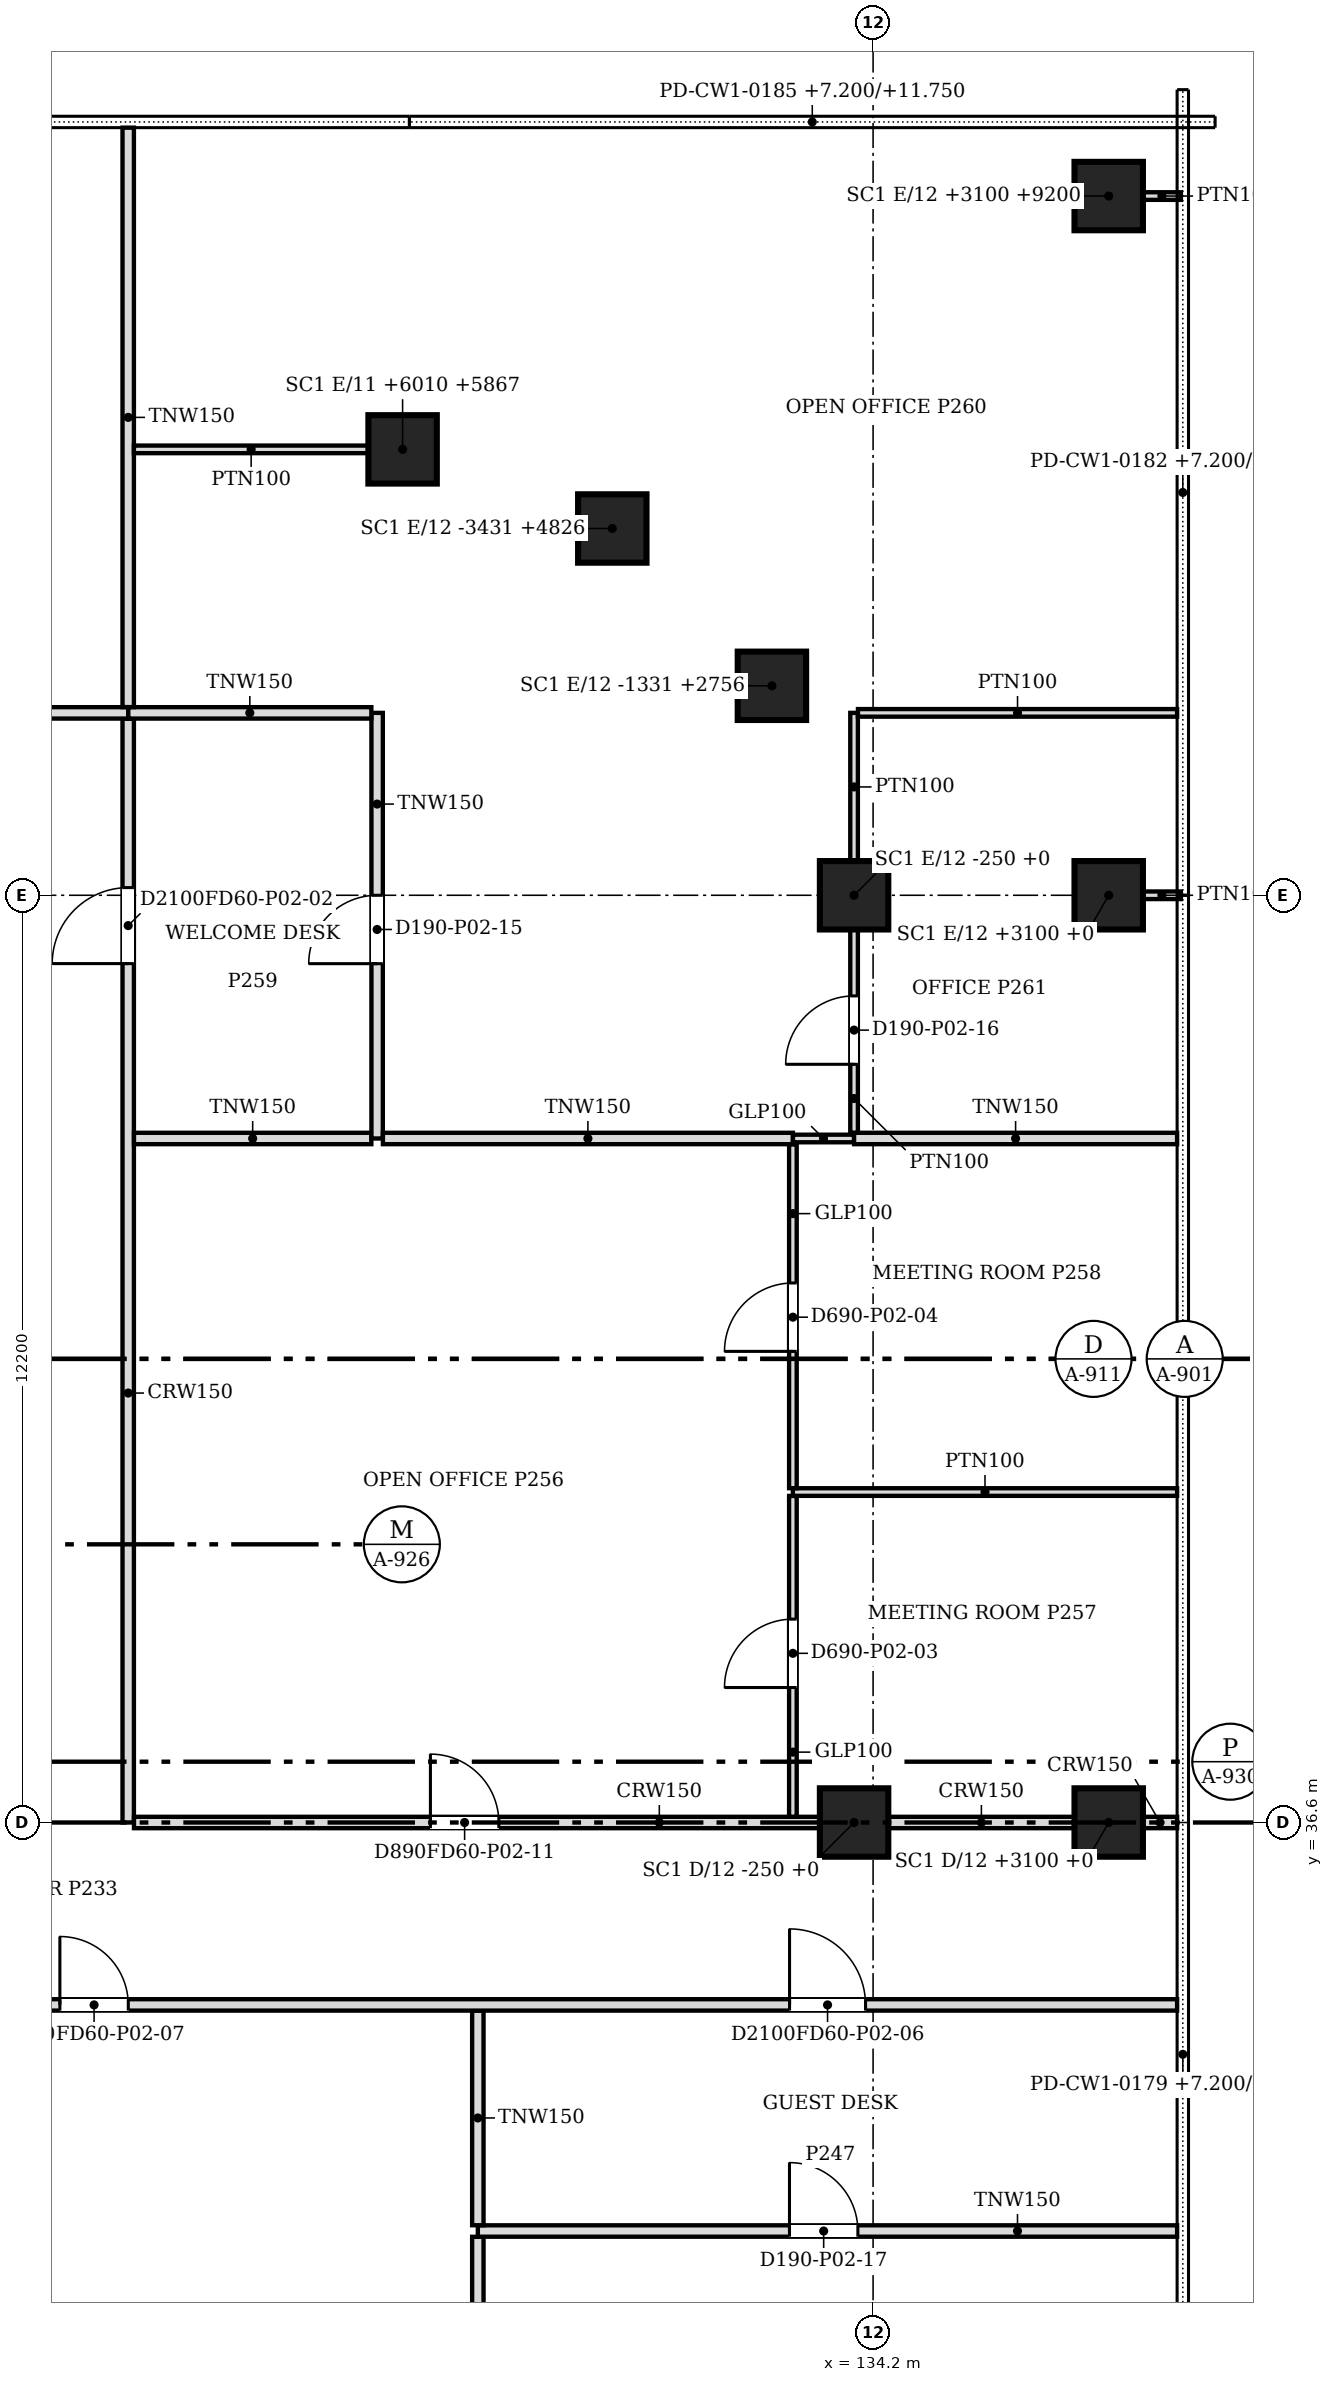
"""IFC4 building model, lengths in metres.
Left out: names, types, materials, properties, quantities, classifications, styles, units other than length and angle.
Written with IfcOpenShell. Run it as: python <this file> out.ifc"""

import sys

from ifc_helpers import new_model, si_unit, direction, frame, frame_2d, origin, origin_2d, place, context, subcontext, project, spatial, rectangle, extrude, source, transform, mapped, element, fill, save


model = new_model("IFC4")
c1 = context("Model", 3, precision=1e-05, world=origin(), true_north=direction((0.0, 1.0)))
c2 = subcontext(c1, "Body", "Model", "MODEL_VIEW")
j1 = project(units=[si_unit("LENGTHUNIT", "METRE"), si_unit("PLANEANGLEUNIT", "RADIAN")], contexts=[c1])
p1 = place(None, origin())
s1 = spatial("IfcSite", under=j1, at=p1, CompositionType="ELEMENT")
p2 = place(p1, origin())
s2 = spatial("IfcBuilding", under=s1, at=p2, CompositionType="ELEMENT")
p3 = place(p2, frame((0.0, 0.0, 7.2)))
s3 = spatial("IfcBuildingStorey", under=s2, at=p3, CompositionType="ELEMENT", Elevation=7.2)
for number, where, z_axis, x_axis in (
    (1, (133.95, 36.6, 0.0), (0.0, 0.0, 1.0), (1.0, 0.0, 0.0)),
    (2, (133.95, 48.8, 0.0), (0.0, 0.0, 1.0), (1.0, 0.0, 0.0)),
    (3, (132.869, 51.556, 0.0), (0.0, 0.0, 1.0), (1.0, 0.0, 0.0)),
    (4, (130.769, 53.626, 0.0), (0.0, 0.0, 1.0), (1.0, 0.0, 0.0)),
    (5, (128.01, 54.667, 0.0), (0.0, 0.0, 1.0), (1.0, 0.0, 0.0)),
    (6, (137.3, 58.0, 0.0), (0.0, 0.0, 1.0), (1.0, 0.0, 0.0)),
    (7, (137.3, 48.8, 0.0), (0.0, 0.0, 1.0), (1.0, 0.0, 0.0)),
    (8, (137.3, 36.6, 0.0), (0.0, 0.0, 1.0), (1.0, 0.0, 0.0)),
):
    element("IfcColumn", number, at=place(p3, frame(where, z_axis=z_axis, x_axis=x_axis)), inside=s3, PredefinedType="COLUMN", context=c2, shape_type="SweptSolid", body=[
        extrude(rectangle(XDim=0.9, YDim=0.9, at=origin_2d()), origin(), (0.0, 0.0, 1.0), 4.55),
    ])
p4 = place(p3, frame((129.0, 18.8, 0.0), z_axis=(0.0, 0.0, 1.0), x_axis=(0.0, 1.0, 0.0)))
e9 = element("IfcWall", 9, at=p4, inside=s3, PredefinedType="PARTITIONING", context=c2, shape_type="SweptSolid", body=[
    extrude(rectangle(XDim=12.349, YDim=0.15, at=frame_2d((6.174, 0.0))), origin(), (0.0, 0.0, 1.0), 3.715),
])
p5 = place(p3, frame((138.2, 31.225, 0.0), z_axis=(0.0, 0.0, 1.0), x_axis=(-1.0, 0.0, 0.0)))
e10 = element("IfcWall", 10, at=p5, inside=s3, PredefinedType="PARTITIONING", context=c2, shape_type="SweptSolid", body=[
    extrude(rectangle(XDim=9.2, YDim=0.15, at=frame_2d((4.6, 0.0))), origin(), (0.0, 0.0, 1.0), 3.715),
])
m1 = source(origin(), c2, "Body", "SweptSolid", [
    extrude(rectangle(XDim=0.9, YDim=2.1, at=frame_2d((0.45, 1.05))), frame((0.0, 0.085, 0.0), z_axis=(0.0, -1.0, 0.0), x_axis=(1.0, 0.0, 0.0)), (0.0, 0.0, 1.0), 0.17),
])
p6 = place(p5, frame((4.2, 0.0, 0.0)))
e11 = element("IfcOpeningElement", 11, at=p6, cuts=e10, PredefinedType="OPENING", context=c2, shape_type="MappedRepresentation", body=[
    mapped(m1, transform((0.0, 0.0, 0.0), scale=1.0)),
])
p7 = place(p3, frame((129.0, 31.301, 0.0), z_axis=(0.0, 0.0, 1.0), x_axis=(0.0, 1.0, 0.0)))
e12 = element("IfcWall", 12, at=p7, inside=s3, PredefinedType="PARTITIONING", context=c2, shape_type="SweptSolid", body=[
    extrude(rectangle(XDim=2.823, YDim=0.15, at=frame_2d((1.412, 0.0))), origin(), (0.0, 0.0, 1.0), 3.715),
])
p8 = place(p3, frame((138.2, 34.2, 0.0), z_axis=(0.0, 0.0, 1.0), x_axis=(-1.0, 0.0, 0.0)))
e13 = element("IfcWall", 13, at=p8, inside=s3, PredefinedType="PARTITIONING", context=c2, shape_type="SweptSolid", body=[
    extrude(rectangle(XDim=46.7, YDim=0.15, at=frame_2d((23.35, 0.0))), origin(), (0.0, 0.0, 1.0), 3.715),
])
m2 = source(origin(), c2, "Body", "SweptSolid", [
    extrude(rectangle(XDim=1.0, YDim=2.1, at=frame_2d((0.5, 1.05))), frame((0.0, 0.085, 0.0), z_axis=(0.0, -1.0, 0.0), x_axis=(1.0, 0.0, 0.0)), (0.0, 0.0, 1.0), 0.17),
])
p9 = place(p8, frame((32.499, 0.0, 0.0)))
e14 = element("IfcOpeningElement", 14, at=p9, cuts=e13, PredefinedType="OPENING", context=c2, shape_type="MappedRepresentation", body=[
    mapped(m2, transform((0.0, 0.0, 0.0), scale=1.0)),
])
p10 = place(p8, frame((4.099, 0.0, 0.0)))
e15 = element("IfcOpeningElement", 15, at=p10, cuts=e13, PredefinedType="OPENING", context=c2, shape_type="MappedRepresentation", body=[
    mapped(m2, transform((0.0, 0.0, 0.0), scale=1.0)),
])
p11 = place(p8, frame((13.799, 0.0, 0.0)))
e16 = element("IfcOpeningElement", 16, at=p11, cuts=e13, PredefinedType="OPENING", context=c2, shape_type="MappedRepresentation", body=[
    mapped(m1, transform((0.0, 0.0, 0.0), scale=1.0)),
])
p12 = place(p8, frame((41.3, 0.0, 0.0)))
e17 = element("IfcOpeningElement", 17, at=p12, cuts=e13, PredefinedType="OPENING", context=c2, shape_type="MappedRepresentation", body=[
    mapped(m1, transform((0.0, 0.0, 0.0), scale=1.0)),
])
p13 = place(p8, frame((23.7, 0.0, 0.0)))
e18 = element("IfcOpeningElement", 18, at=p13, cuts=e13, PredefinedType="OPENING", context=c2, shape_type="MappedRepresentation", body=[
    mapped(m2, transform((0.0, 0.0, 0.0), scale=1.0)),
])
p14 = place(p3, frame((124.4, 51.124, 0.0), z_axis=(0.0, 0.0, 1.0), x_axis=(0.0, -1.0, 0.0)))
e19 = element("IfcWall", 19, at=p14, inside=s3, PredefinedType="PARTITIONING", context=c2, shape_type="SweptSolid", body=[
    extrude(rectangle(XDim=14.524, YDim=0.15, at=frame_2d((7.262, 0.0))), origin(), (0.0, 0.0, 1.0), 3.715),
])
p15 = place(p14, frame((2.223, 0.0, 0.0)))
e20 = element("IfcOpeningElement", 20, at=p15, cuts=e19, PredefinedType="OPENING", context=c2, shape_type="MappedRepresentation", body=[
    mapped(m2, transform((0.0, 0.0, 0.0), scale=1.0)),
])
p16 = place(p3, frame((124.476, 36.6, 0.0), z_axis=(0.0, 0.0, 1.0), x_axis=(1.0, 0.0, 0.0)))
e21 = element("IfcWall", 21, at=p16, inside=s3, PredefinedType="PARTITIONING", context=c2, shape_type="SweptSolid", body=[
    extrude(rectangle(XDim=9.023, YDim=0.15, at=frame_2d((4.511, 0.0))), origin(), (0.0, 0.0, 1.0), 3.715),
])
p17 = place(p16, frame((3.9, 0.0, 0.0)))
e22 = element("IfcOpeningElement", 22, at=p17, cuts=e21, PredefinedType="OPENING", context=c2, shape_type="MappedRepresentation", body=[
    mapped(m1, transform((0.0, 0.0, 0.0), scale=1.0)),
])
p18 = place(p3, frame((134.401, 36.6, 0.0), z_axis=(0.0, 0.0, 1.0), x_axis=(1.0, 0.0, 0.0)))
e23 = element("IfcWall", 23, at=p18, inside=s3, PredefinedType="PARTITIONING", context=c2, shape_type="SweptSolid", body=[
    extrude(rectangle(XDim=2.448, YDim=0.15, at=frame_2d((1.224, 0.0))), origin(), (0.0, 0.0, 1.0), 3.715),
])
p19 = place(p3, frame((137.751, 36.6, 0.0), z_axis=(0.0, 0.0, 1.0), x_axis=(1.0, 0.0, 0.0)))
e24 = element("IfcWall", 24, at=p19, inside=s3, PredefinedType="PARTITIONING", context=c2, shape_type="SweptSolid", body=[
    extrude(rectangle(XDim=0.449, YDim=0.15, at=frame_2d((0.225, 0.0))), origin(), (0.0, 0.0, 1.0), 3.715),
])
p20 = place(p3, frame((133.145, 40.897, 0.0), z_axis=(0.0, 0.0, 1.0), x_axis=(0.0, -1.0, 0.0)))
e25 = element("IfcWall", 25, at=p20, inside=s3, PredefinedType="PARTITIONING", context=c2, shape_type="SweptSolid", body=[
    extrude(rectangle(XDim=4.221, YDim=0.1, at=frame_2d((2.11, 0.0))), origin(), (0.0, 0.0, 1.0), 3.715),
])
m3 = source(origin(), c2, "Body", "SweptSolid", [
    extrude(rectangle(XDim=0.9, YDim=2.1, at=frame_2d((0.45, 1.05))), frame((0.0, 0.06, 0.0), z_axis=(0.0, -1.0, 0.0), x_axis=(1.0, 0.0, 0.0)), (0.0, 0.0, 1.0), 0.12),
])
p21 = place(p20, frame((1.621, 0.0, 0.0)))
e26 = element("IfcOpeningElement", 26, at=p21, cuts=e25, PredefinedType="OPENING", context=c2, shape_type="MappedRepresentation", body=[
    mapped(m3, transform((0.0, 0.0, 0.0), scale=1.0)),
])
p22 = place(p3, frame((133.145, 40.948, 0.0), z_axis=(0.0, 0.0, 1.0), x_axis=(1.0, 0.0, 0.0)))
e27 = element("IfcWall", 27, at=p22, inside=s3, PredefinedType="PARTITIONING", context=c2, shape_type="SweptSolid", body=[
    extrude(rectangle(XDim=5.055, YDim=0.1, at=frame_2d((2.527, 0.0))), origin(), (0.0, 0.0, 1.0), 3.715),
])
p23 = place(p3, frame((133.145, 45.524, 0.0), z_axis=(0.0, 0.0, 1.0), x_axis=(0.0, -1.0, 0.0)))
e28 = element("IfcWall", 28, at=p23, inside=s3, PredefinedType="PARTITIONING", context=c2, shape_type="SweptSolid", body=[
    extrude(rectangle(XDim=4.525, YDim=0.1, at=frame_2d((2.263, 0.0))), origin(), (0.0, 0.0, 1.0), 3.715),
])
p24 = place(p23, frame((1.825, 0.0, 0.0)))
e29 = element("IfcOpeningElement", 29, at=p24, cuts=e28, PredefinedType="OPENING", context=c2, shape_type="MappedRepresentation", body=[
    mapped(m3, transform((0.0, 0.0, 0.0), scale=1.0)),
])
p25 = place(p3, frame((124.476, 45.6, 0.0), z_axis=(0.0, 0.0, 1.0), x_axis=(1.0, 0.0, 0.0)))
e30 = element("IfcWall", 30, at=p25, inside=s3, PredefinedType="PARTITIONING", context=c2, shape_type="SweptSolid", body=[
    extrude(rectangle(XDim=3.123, YDim=0.15, at=frame_2d((1.562, 0.0))), origin(), (0.0, 0.0, 1.0), 3.715),
])
p26 = place(p3, frame((127.675, 51.2, 0.0), z_axis=(0.0, 0.0, 1.0), x_axis=(0.0, -1.0, 0.0)))
e31 = element("IfcWall", 31, at=p26, inside=s3, PredefinedType="PARTITIONING", context=c2, shape_type="SweptSolid", body=[
    extrude(rectangle(XDim=5.6, YDim=0.15, at=frame_2d((2.8, 0.0))), origin(), (0.0, 0.0, 1.0), 3.715),
])
p27 = place(p26, frame((2.4, 0.0, 0.0)))
e32 = element("IfcOpeningElement", 32, at=p27, cuts=e31, PredefinedType="OPENING", context=c2, shape_type="MappedRepresentation", body=[
    mapped(m1, transform((0.0, 0.0, 0.0), scale=1.0)),
])
p28 = place(p3, frame((127.751, 45.6, 0.0), z_axis=(0.0, 0.0, 1.0), x_axis=(1.0, 0.0, 0.0)))
e33 = element("IfcWall", 33, at=p28, inside=s3, PredefinedType="PARTITIONING", context=c2, shape_type="SweptSolid", body=[
    extrude(rectangle(XDim=5.394, YDim=0.15, at=frame_2d((2.697, 0.0))), origin(), (0.0, 0.0, 1.0), 3.715),
])
p29 = place(p3, frame((133.146, 45.6, 0.0), z_axis=(0.0, 0.0, 1.0), x_axis=(1.0, 0.0, 0.0)))
e34 = element("IfcWall", 34, at=p29, inside=s3, PredefinedType="PARTITIONING", context=c2, shape_type="SweptSolid", body=[
    extrude(rectangle(XDim=0.803, YDim=0.1, at=frame_2d((0.401, 0.0))), origin(), (0.0, 0.0, 1.0), 3.715),
])
p30 = place(p3, frame((133.95, 45.6, 0.0), z_axis=(0.0, 0.0, 1.0), x_axis=(1.0, 0.0, 0.0)))
e35 = element("IfcWall", 35, at=p30, inside=s3, PredefinedType="PARTITIONING", context=c2, shape_type="SweptSolid", body=[
    extrude(rectangle(XDim=4.25, YDim=0.15, at=frame_2d((2.125, 0.0))), origin(), (0.0, 0.0, 1.0), 3.715),
])
p31 = place(p3, frame((133.95, 48.349, 0.0), z_axis=(0.0, 0.0, 1.0), x_axis=(0.0, -1.0, 0.0)))
e36 = element("IfcWall", 36, at=p31, inside=s3, PredefinedType="PARTITIONING", context=c2, shape_type="SweptSolid", body=[
    extrude(rectangle(XDim=2.673, YDim=0.1, at=frame_2d((1.336, 0.0))), origin(), (0.0, 0.0, 1.0), 3.715),
])
p32 = place(p31, frame((0.873, 0.0, 0.0)))
e37 = element("IfcOpeningElement", 37, at=p32, cuts=e36, PredefinedType="OPENING", context=c2, shape_type="MappedRepresentation", body=[
    mapped(m3, transform((0.0, 0.0, 0.0), scale=1.0)),
])
p33 = place(p3, frame((137.75, 48.8, 0.0), z_axis=(0.0, 0.0, 1.0), x_axis=(1.0, 0.0, 0.0)))
e38 = element("IfcWall", 38, at=p33, inside=s3, PredefinedType="PARTITIONING", context=c2, shape_type="SweptSolid", body=[
    extrude(rectangle(XDim=0.5, YDim=0.1, at=frame_2d((0.25, 0.0))), origin(), (0.0, 0.0, 1.0), 3.715),
])
p34 = place(p3, frame((133.95, 49.251, 0.0), z_axis=(0.0, 0.0, 1.0), x_axis=(0.0, 1.0, 0.0)))
e39 = element("IfcWall", 39, at=p34, inside=s3, PredefinedType="PARTITIONING", context=c2, shape_type="SweptSolid", body=[
    extrude(rectangle(XDim=1.949, YDim=0.1, at=frame_2d((0.975, 0.0))), origin(), (0.0, 0.0, 1.0), 3.715),
])
p35 = place(p3, frame((108.5, 51.2, 0.0), z_axis=(0.0, 0.0, 1.0), x_axis=(1.0, 0.0, 0.0)))
e40 = element("IfcWall", 40, at=p35, inside=s3, PredefinedType="PARTITIONING", context=c2, shape_type="SweptSolid", body=[
    extrude(rectangle(XDim=15.9, YDim=0.15, at=frame_2d((7.95, 0.0))), origin(), (0.0, 0.0, 1.0), 3.715),
])
p36 = place(p35, frame((11.551, 0.0, 0.0)))
e41 = element("IfcOpeningElement", 41, at=p36, cuts=e40, PredefinedType="OPENING", context=c2, shape_type="MappedRepresentation", body=[
    mapped(m1, transform((0.0, 0.0, 0.0), scale=1.0)),
])
p37 = place(p35, frame((3.6, 0.0, 0.0)))
e42 = element("IfcOpeningElement", 42, at=p37, cuts=e40, PredefinedType="OPENING", context=c2, shape_type="MappedRepresentation", body=[
    mapped(m1, transform((0.0, 0.0, 0.0), scale=1.0)),
])
p38 = place(p3, frame((124.401, 51.2, 0.0), z_axis=(0.0, 0.0, 1.0), x_axis=(1.0, 0.0, 0.0)))
e43 = element("IfcWall", 43, at=p38, inside=s3, PredefinedType="PARTITIONING", context=c2, shape_type="SweptSolid", body=[
    extrude(rectangle(XDim=3.198, YDim=0.15, at=frame_2d((1.599, 0.0))), origin(), (0.0, 0.0, 1.0), 3.715),
])
p39 = place(p3, frame((134.001, 51.2, 0.0), z_axis=(0.0, 0.0, 1.0), x_axis=(1.0, 0.0, 0.0)))
e44 = element("IfcWall", 44, at=p39, inside=s3, PredefinedType="PARTITIONING", context=c2, shape_type="SweptSolid", body=[
    extrude(rectangle(XDim=4.199, YDim=0.1, at=frame_2d((2.1, 0.0))), origin(), (0.0, 0.0, 1.0), 3.715),
])
p40 = place(p3, frame((124.4, 51.276, 0.0), z_axis=(0.0, 0.0, 1.0), x_axis=(0.0, 1.0, 0.0)))
e45 = element("IfcWall", 45, at=p40, inside=s3, PredefinedType="PARTITIONING", context=c2, shape_type="SweptSolid", body=[
    extrude(rectangle(XDim=7.624, YDim=0.15, at=frame_2d((3.812, 0.0))), origin(), (0.0, 0.0, 1.0), 3.715),
])
p41 = place(p3, frame((127.56, 54.667, 0.0), z_axis=(0.0, 0.0, 1.0), x_axis=(-1.0, 0.0, 0.0)))
e46 = element("IfcWall", 46, at=p41, inside=s3, PredefinedType="PARTITIONING", context=c2, shape_type="SweptSolid", body=[
    extrude(rectangle(XDim=3.085, YDim=0.1, at=frame_2d((1.542, 0.0))), origin(), (0.0, 0.0, 1.0), 3.715),
])
p42 = place(p3, frame((137.75, 58.0, 0.0), z_axis=(0.0, 0.0, 1.0), x_axis=(1.0, 0.0, 0.0)))
e47 = element("IfcWall", 47, at=p42, inside=s3, PredefinedType="PARTITIONING", context=c2, shape_type="SweptSolid", body=[
    extrude(rectangle(XDim=0.5, YDim=0.1, at=frame_2d((0.25, 0.0))), origin(), (0.0, 0.0, 1.0), 3.715),
])
m4 = source(origin(), c2, "Body", "SweptSolid", [
    extrude(rectangle(XDim=0.9, YDim=2.1, at=frame_2d((0.45, 1.05))), frame((0.0, 0.025, 0.0), z_axis=(0.0, -1.0, 0.0), x_axis=(1.0, 0.0, 0.0)), (0.0, 0.0, 1.0), 0.05),
])
p43 = place(p21, origin())
e48 = element("IfcDoor", 48, at=p43, inside=s3, OperationType="SINGLE_SWING_RIGHT", PredefinedType="DOOR", context=c2, shape_type="MappedRepresentation", body=[
    mapped(m4, transform((0.0, 0.0, 0.0), scale=1.0)),
])
fill(e26, e48)
p44 = place(p24, origin())
e49 = element("IfcDoor", 49, at=p44, inside=s3, OperationType="SINGLE_SWING_RIGHT", PredefinedType="DOOR", context=c2, shape_type="MappedRepresentation", body=[
    mapped(m4, transform((0.0, 0.0, 0.0), scale=1.0)),
])
fill(e29, e49)
m5 = source(origin(), c2, "Body", "SweptSolid", [
    extrude(rectangle(XDim=1.0, YDim=2.1, at=frame_2d((0.5, 1.05))), frame((0.0, 0.025, 0.0), z_axis=(0.0, -1.0, 0.0), x_axis=(1.0, 0.0, 0.0)), (0.0, 0.0, 1.0), 0.05),
])
p45 = place(p15, origin())
e50 = element("IfcDoor", 50, at=p45, inside=s3, OperationType="SINGLE_SWING_RIGHT", PredefinedType="DOOR", context=c2, shape_type="MappedRepresentation", body=[
    mapped(m5, transform((0.0, 0.0, 0.0), scale=1.0)),
])
fill(e20, e50)
p46 = place(p27, origin())
e51 = element("IfcDoor", 51, at=p46, inside=s3, OperationType="SINGLE_SWING_RIGHT", PredefinedType="DOOR", context=c2, shape_type="MappedRepresentation", body=[
    mapped(m4, transform((0.0, 0.0, 0.0), scale=1.0)),
])
fill(e32, e51)
p47 = place(p32, origin())
e52 = element("IfcDoor", 52, at=p47, inside=s3, OperationType="SINGLE_SWING_RIGHT", PredefinedType="DOOR", context=c2, shape_type="MappedRepresentation", body=[
    mapped(m4, transform((0.0, 0.0, 0.0), scale=1.0)),
])
fill(e37, e52)
p48 = place(p10, origin())
e53 = element("IfcDoor", 53, at=p48, inside=s3, OperationType="SINGLE_SWING_RIGHT", PredefinedType="DOOR", context=c2, shape_type="MappedRepresentation", body=[
    mapped(m5, transform((0.0, 0.0, 0.0), scale=1.0)),
])
fill(e15, e53)
p49 = place(p6, origin())
e54 = element("IfcDoor", 54, at=p49, inside=s3, OperationType="SINGLE_SWING_RIGHT", PredefinedType="DOOR", context=c2, shape_type="MappedRepresentation", body=[
    mapped(m4, transform((0.0, 0.0, 0.0), scale=1.0)),
])
fill(e11, e54)
p50 = place(p11, origin())
e55 = element("IfcDoor", 55, at=p50, inside=s3, OperationType="SINGLE_SWING_RIGHT", PredefinedType="DOOR", context=c2, shape_type="MappedRepresentation", body=[
    mapped(m4, transform((0.0, 0.0, 0.0), scale=1.0)),
])
fill(e16, e55)
p51 = place(p17, origin())
e56 = element("IfcDoor", 56, at=p51, inside=s3, OperationType="SINGLE_SWING_LEFT", PredefinedType="DOOR", context=c2, shape_type="MappedRepresentation", body=[
    mapped(m4, transform((0.0, 0.0, 0.0), scale=1.0)),
])
fill(e22, e56)
save(model, sys.argv[1])
